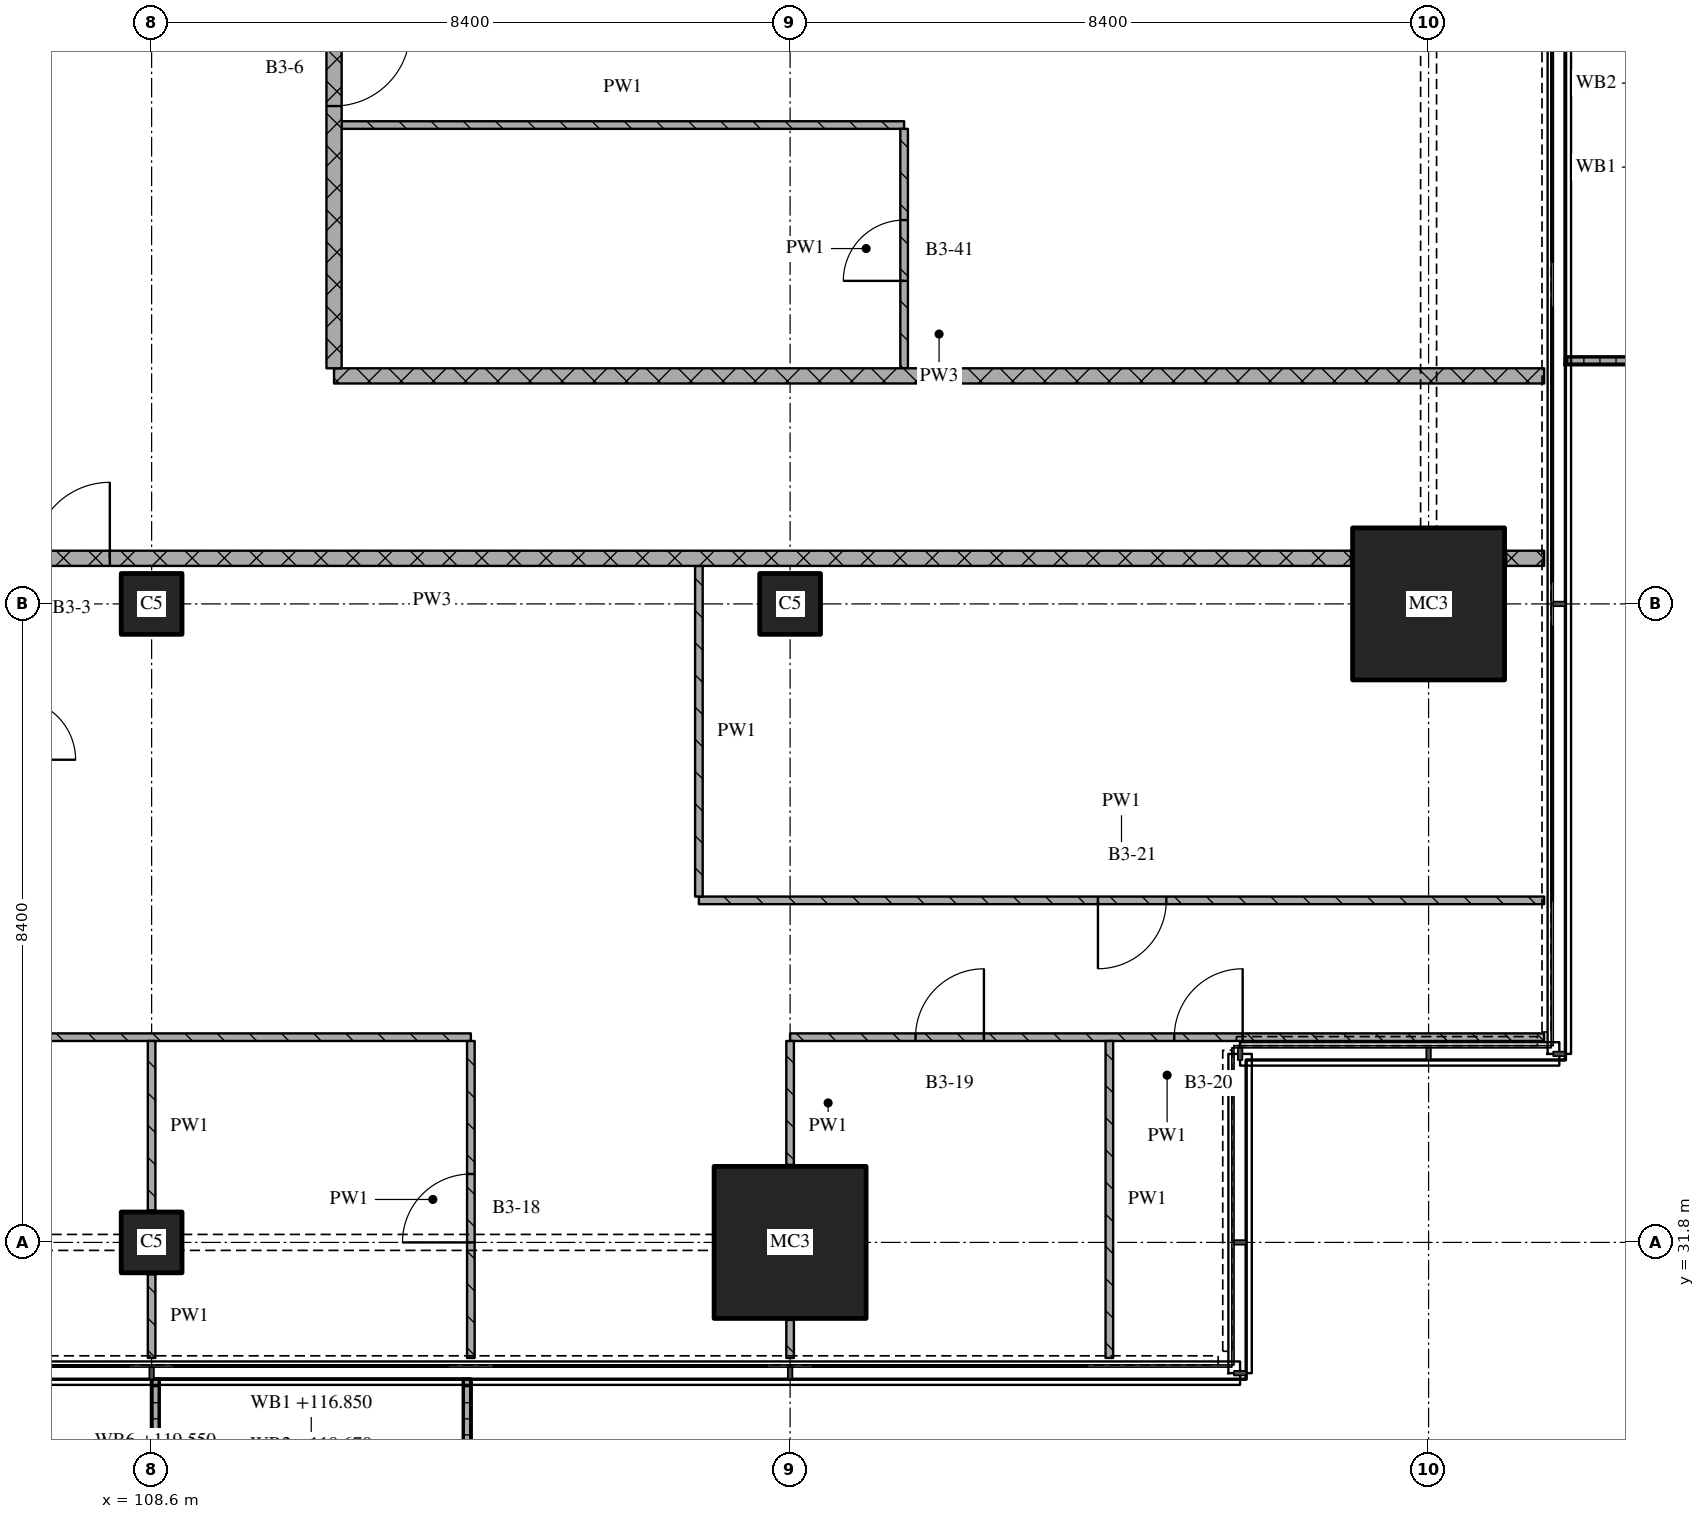
"""IFC4 building model, lengths in metres.
Left out: names, types, materials, properties, quantities, classifications, styles, units other than length and angle.
Written with IfcOpenShell. Run it as: python <this file> out.ifc"""

import sys

from ifc_helpers import new_model, si_unit, direction, frame, frame_2d, origin, origin_2d, place, context, subcontext, project, spatial, polyline, rectangle, outline, extrude, element, fill, save


model = new_model("IFC4")
c1 = context("Model", 3, precision=1e-05, world=origin(), true_north=direction((0.0, 1.0)))
c2 = subcontext(c1, "Body", "Model", "MODEL_VIEW")
j1 = project(units=[si_unit("LENGTHUNIT", "METRE"), si_unit("PLANEANGLEUNIT", "RADIAN")], contexts=[c1])
p1 = place(None, origin())
s1 = spatial("IfcSite", under=j1, at=p1, CompositionType="ELEMENT")
p2 = place(p1, origin())
s2 = spatial("IfcBuilding", under=s1, at=p2, CompositionType="ELEMENT")
p3 = place(p2, frame((0.0, 0.0, 116.85)))
s3 = spatial("IfcBuildingStorey", under=s2, at=p3, CompositionType="ELEMENT", Elevation=116.85)
for number, where, z_axis, x_axis in (
    (1, (108.6, 31.8, 0.0), (0.0, 0.0, 1.0), (1.0, 0.0, 0.0)),
    (2, (108.6, 40.2, 0.0), (0.0, 0.0, 1.0), (1.0, 0.0, 0.0)),
):
    element("IfcColumn", number, at=place(p3, frame(where, z_axis=z_axis, x_axis=x_axis)), inside=s3, PredefinedType="COLUMN", context=c2, shape_type="SweptSolid", body=[
        extrude(rectangle(XDim=0.8, YDim=0.8, at=origin_2d()), origin(), (0.0, 0.0, 1.0), 3.6),
    ])
p4 = place(p3, frame((117.0, 31.8, 0.0), z_axis=(0.0, 0.0, 1.0), x_axis=(1.0, 0.0, 0.0)))
e3 = element("IfcColumn", 3, at=p4, inside=s3, PredefinedType="COLUMN", context=c2, shape_type="SweptSolid", body=[
    extrude(rectangle(XDim=2.0, YDim=2.0, at=origin_2d()), origin(), (0.0, 0.0, 1.0), 3.6),
])
p5 = place(p3, frame((117.0, 40.2, 0.0), z_axis=(0.0, 0.0, 1.0), x_axis=(1.0, 0.0, 0.0)))
e4 = element("IfcColumn", 4, at=p5, inside=s3, PredefinedType="COLUMN", context=c2, shape_type="SweptSolid", body=[
    extrude(rectangle(XDim=0.8, YDim=0.8, at=origin_2d()), origin(), (0.0, 0.0, 1.0), 3.6),
])
p6 = place(p3, frame((125.4, 40.2, 0.0), z_axis=(0.0, 0.0, 1.0), x_axis=(1.0, 0.0, 0.0)))
e5 = element("IfcColumn", 5, at=p6, inside=s3, PredefinedType="COLUMN", context=c2, shape_type="SweptSolid", body=[
    extrude(rectangle(XDim=2.0, YDim=2.0, at=origin_2d()), origin(), (0.0, 0.0, 1.0), 3.6),
])
p7 = place(p3, origin())
e6 = element("IfcWall", 6, at=p7, inside=s3, PredefinedType="SOLIDWALL", context=c2, shape_type="SweptSolid", body=[
    extrude(outline(polyline([(108.6, 30.0), (108.7, 30.0), (108.7, 28.367), (112.7, 28.367), (112.7, 30.0), (112.8, 30.0), (112.8, 28.267), (108.6, 28.267), (108.6, 30.0)])), origin(), (0.0, 0.0, 1.0), 1.0),
])
p8 = place(p3, origin())
e7 = element("IfcWall", 7, at=p8, inside=s3, PredefinedType="SOLIDWALL", context=c2, shape_type="SweptSolid", body=[
    extrude(outline(polyline([(127.2, 43.35), (127.2, 43.45), (128.967, 43.45), (128.967, 49.55), (127.2, 49.55), (127.2, 49.65), (129.067, 49.65), (129.067, 43.35), (127.2, 43.35)])), origin(), (0.0, 0.0, 1.0), 1.0),
])
p9 = place(p3, frame((112.8, 34.5, 0.0), z_axis=(0.0, 0.0, 1.0), x_axis=(-1.0, 0.0, 0.0)))
e8 = element("IfcWall", 8, at=p9, inside=s3, PredefinedType="PARTITIONING", context=c2, shape_type="SweptSolid", body=[
    extrude(rectangle(XDim=12.5, YDim=0.1, at=frame_2d((6.25, 0.0))), origin(), (0.0, 0.0, 1.0), 3.32),
])
p10 = place(p9, frame((7.95, 0.0, 0.0)))
e9 = element("IfcOpeningElement", 9, at=p10, cuts=e8, PredefinedType="OPENING", context=c2, shape_type="SweptSolid", body=[
    extrude(rectangle(XDim=0.9, YDim=2.1, at=frame_2d((0.45, 1.05))), frame((0.0, 0.06, 0.0), z_axis=(0.0, -1.0, 0.0), x_axis=(1.0, 0.0, 0.0)), (0.0, 0.0, 1.0), 0.12),
])
p11 = place(p3, frame((126.92, 34.5, 0.0), z_axis=(0.0, 0.0, 1.0), x_axis=(-1.0, 0.0, 0.0)))
e10 = element("IfcWall", 10, at=p11, inside=s3, PredefinedType="PARTITIONING", context=c2, shape_type="SweptSolid", body=[
    extrude(rectangle(XDim=9.92, YDim=0.1, at=frame_2d((4.96, 0.0))), origin(), (0.0, 0.0, 1.0), 3.32),
])
p12 = place(p11, frame((3.966, 0.0, 0.0)))
e11 = element("IfcOpeningElement", 11, at=p12, cuts=e10, PredefinedType="OPENING", context=c2, shape_type="SweptSolid", body=[
    extrude(rectangle(XDim=0.9, YDim=2.1, at=frame_2d((0.45, 1.05))), frame((0.0, 0.06, 0.0), z_axis=(0.0, -1.0, 0.0), x_axis=(1.0, 0.0, 0.0)), (0.0, 0.0, 1.0), 0.12),
])
p13 = place(p11, frame((7.37, 0.0, 0.0)))
e12 = element("IfcOpeningElement", 12, at=p13, cuts=e10, PredefinedType="OPENING", context=c2, shape_type="SweptSolid", body=[
    extrude(rectangle(XDim=0.9, YDim=2.1, at=frame_2d((0.45, 1.05))), frame((0.0, 0.06, 0.0), z_axis=(0.0, -1.0, 0.0), x_axis=(1.0, 0.0, 0.0)), (0.0, 0.0, 1.0), 0.12),
])
p14 = place(p3, frame((115.8, 36.3, 0.0), z_axis=(0.0, 0.0, 1.0), x_axis=(1.0, 0.0, 0.0)))
e13 = element("IfcWall", 13, at=p14, inside=s3, PredefinedType="PARTITIONING", context=c2, shape_type="SweptSolid", body=[
    extrude(rectangle(XDim=11.12, YDim=0.1, at=frame_2d((5.56, 0.0))), origin(), (0.0, 0.0, 1.0), 3.32),
])
p15 = place(p14, frame((5.25, 0.0, 0.0)))
e14 = element("IfcOpeningElement", 14, at=p15, cuts=e13, PredefinedType="OPENING", context=c2, shape_type="SweptSolid", body=[
    extrude(rectangle(XDim=0.9, YDim=2.1, at=frame_2d((0.45, 1.05))), frame((0.0, 0.06, 0.0), z_axis=(0.0, -1.0, 0.0), x_axis=(1.0, 0.0, 0.0)), (0.0, 0.0, 1.0), 0.12),
])
p16 = place(p3, frame((124.38, 40.8, 0.0), z_axis=(0.0, 0.0, 1.0), x_axis=(-1.0, 0.0, 0.0)))
e15 = element("IfcWall", 15, at=p16, inside=s3, PredefinedType="PARTITIONING", context=c2, shape_type="SweptSolid", body=[
    extrude(rectangle(XDim=24.18, YDim=0.2, at=frame_2d((12.09, 0.0))), origin(), (0.0, 0.0, 1.0), 3.32),
])
p17 = place(p16, frame((16.33, 0.0, 0.0)))
e16 = element("IfcOpeningElement", 16, at=p17, cuts=e15, PredefinedType="OPENING", context=c2, shape_type="SweptSolid", body=[
    extrude(rectangle(XDim=1.0, YDim=2.1, at=frame_2d((0.5, 1.05))), frame((0.0, 0.11, 0.0), z_axis=(0.0, -1.0, 0.0), x_axis=(1.0, 0.0, 0.0)), (0.0, 0.0, 1.0), 0.22),
])
p18 = place(p3, frame((126.42, 40.8, 0.0), z_axis=(0.0, 0.0, 1.0), x_axis=(1.0, 0.0, 0.0)))
e17 = element("IfcWall", 17, at=p18, inside=s3, PredefinedType="PARTITIONING", context=c2, shape_type="SweptSolid", body=[
    extrude(rectangle(XDim=0.5, YDim=0.2, at=frame_2d((0.25, 0.0))), origin(), (0.0, 0.0, 1.0), 3.32),
])
p19 = place(p3, frame((111.0, 43.2, 0.0), z_axis=(0.0, 0.0, 1.0), x_axis=(1.0, 0.0, 0.0)))
e18 = element("IfcWall", 18, at=p19, inside=s3, PredefinedType="PARTITIONING", context=c2, shape_type="SweptSolid", body=[
    extrude(rectangle(XDim=15.92, YDim=0.2, at=frame_2d((7.96, 0.0))), origin(), (0.0, 0.0, 1.0), 3.32),
])
p20 = place(p3, frame((111.1, 46.5, 0.0), z_axis=(0.0, 0.0, 1.0), x_axis=(1.0, 0.0, 0.0)))
e19 = element("IfcWall", 19, at=p20, inside=s3, PredefinedType="PARTITIONING", context=c2, shape_type="SweptSolid", body=[
    extrude(rectangle(XDim=7.4, YDim=0.1, at=frame_2d((3.7, 0.0))), origin(), (0.0, 0.0, 1.0), 3.32),
])
p21 = place(p3, frame((108.6, 31.38, 0.0), z_axis=(0.0, 0.0, 1.0), x_axis=(0.0, -1.0, 0.0)))
e20 = element("IfcWall", 20, at=p21, inside=s3, PredefinedType="PARTITIONING", context=c2, shape_type="SweptSolid", body=[
    extrude(rectangle(XDim=1.1, YDim=0.1, at=frame_2d((0.55, 0.0))), origin(), (0.0, 0.0, 1.0), 3.32),
])
p22 = place(p3, frame((108.6, 34.45, 0.0), z_axis=(0.0, 0.0, 1.0), x_axis=(0.0, -1.0, 0.0)))
e21 = element("IfcWall", 21, at=p22, inside=s3, PredefinedType="PARTITIONING", context=c2, shape_type="SweptSolid", body=[
    extrude(rectangle(XDim=2.23, YDim=0.1, at=frame_2d((1.115, 0.0))), origin(), (0.0, 0.0, 1.0), 3.32),
])
p23 = place(p3, frame((111.0, 75.32, 0.0), z_axis=(0.0, 0.0, 1.0), x_axis=(0.0, -1.0, 0.0)))
e22 = element("IfcWall", 22, at=p23, inside=s3, PredefinedType="PARTITIONING", context=c2, shape_type="SweptSolid", body=[
    extrude(rectangle(XDim=32.02, YDim=0.2, at=frame_2d((16.01, 0.0))), origin(), (0.0, 0.0, 1.0), 3.32),
])
p24 = place(p23, frame((11.37, 0.0, 0.0)))
e23 = element("IfcOpeningElement", 23, at=p24, cuts=e22, PredefinedType="OPENING", context=c2, shape_type="SweptSolid", body=[
    extrude(rectangle(XDim=1.0, YDim=2.1, at=frame_2d((0.5, 1.05))), frame((0.0, 0.11, 0.0), z_axis=(0.0, -1.0, 0.0), x_axis=(1.0, 0.0, 0.0)), (0.0, 0.0, 1.0), 0.22),
])
p25 = place(p23, frame((27.57, 0.0, 0.0)))
e24 = element("IfcOpeningElement", 24, at=p25, cuts=e22, PredefinedType="OPENING", context=c2, shape_type="SweptSolid", body=[
    extrude(rectangle(XDim=1.0, YDim=2.1, at=frame_2d((0.5, 1.05))), frame((0.0, 0.11, 0.0), z_axis=(0.0, -1.0, 0.0), x_axis=(1.0, 0.0, 0.0)), (0.0, 0.0, 1.0), 0.22),
])
p26 = place(p3, frame((112.8, 30.28, 0.0), z_axis=(0.0, 0.0, 1.0), x_axis=(0.0, 1.0, 0.0)))
e25 = element("IfcWall", 25, at=p26, inside=s3, PredefinedType="PARTITIONING", context=c2, shape_type="SweptSolid", body=[
    extrude(rectangle(XDim=4.17, YDim=0.1, at=frame_2d((2.085, 0.0))), origin(), (0.0, 0.0, 1.0), 3.32),
])
p27 = place(p26, frame((1.52, 0.0, 0.0)))
e26 = element("IfcOpeningElement", 26, at=p27, cuts=e25, PredefinedType="OPENING", context=c2, shape_type="SweptSolid", body=[
    extrude(rectangle(XDim=0.9, YDim=2.1, at=frame_2d((0.45, 1.05))), frame((0.0, 0.06, 0.0), z_axis=(0.0, -1.0, 0.0), x_axis=(1.0, 0.0, 0.0)), (0.0, 0.0, 1.0), 0.12),
])
p28 = place(p3, frame((115.8, 40.7, 0.0), z_axis=(0.0, 0.0, 1.0), x_axis=(0.0, -1.0, 0.0)))
e27 = element("IfcWall", 27, at=p28, inside=s3, PredefinedType="PARTITIONING", context=c2, shape_type="SweptSolid", body=[
    extrude(rectangle(XDim=4.35, YDim=0.1, at=frame_2d((2.175, 0.0))), origin(), (0.0, 0.0, 1.0), 3.32),
])
p29 = place(p3, frame((117.0, 30.78, 0.0), z_axis=(0.0, 0.0, 1.0), x_axis=(0.0, -1.0, 0.0)))
e28 = element("IfcWall", 28, at=p29, inside=s3, PredefinedType="PARTITIONING", context=c2, shape_type="SweptSolid", body=[
    extrude(rectangle(XDim=0.5, YDim=0.1, at=frame_2d((0.25, 0.0))), origin(), (0.0, 0.0, 1.0), 3.32),
])
p30 = place(p3, frame((117.0, 34.45, 0.0), z_axis=(0.0, 0.0, 1.0), x_axis=(0.0, -1.0, 0.0)))
e29 = element("IfcWall", 29, at=p30, inside=s3, PredefinedType="PARTITIONING", context=c2, shape_type="SweptSolid", body=[
    extrude(rectangle(XDim=1.63, YDim=0.1, at=frame_2d((0.815, 0.0))), origin(), (0.0, 0.0, 1.0), 3.32),
])
p31 = place(p3, frame((118.5, 43.3, 0.0), z_axis=(0.0, 0.0, 1.0), x_axis=(0.0, 1.0, 0.0)))
e30 = element("IfcWall", 30, at=p31, inside=s3, PredefinedType="PARTITIONING", context=c2, shape_type="SweptSolid", body=[
    extrude(rectangle(XDim=3.15, YDim=0.1, at=frame_2d((1.575, 0.0))), origin(), (0.0, 0.0, 1.0), 3.32),
])
p32 = place(p31, frame((1.15, 0.0, 0.0)))
e31 = element("IfcOpeningElement", 31, at=p32, cuts=e30, PredefinedType="OPENING", context=c2, shape_type="SweptSolid", body=[
    extrude(rectangle(XDim=0.8, YDim=2.1, at=frame_2d((0.4, 1.05))), frame((0.0, 0.06, 0.0), z_axis=(0.0, -1.0, 0.0), x_axis=(1.0, 0.0, 0.0)), (0.0, 0.0, 1.0), 0.12),
])
p33 = place(p3, frame((121.2, 34.45, 0.0), z_axis=(0.0, 0.0, 1.0), x_axis=(0.0, -1.0, 0.0)))
e32 = element("IfcWall", 32, at=p33, inside=s3, PredefinedType="PARTITIONING", context=c2, shape_type="SweptSolid", body=[
    extrude(rectangle(XDim=4.17, YDim=0.1, at=frame_2d((2.085, 0.0))), origin(), (0.0, 0.0, 1.0), 3.32),
])
p34 = place(p12, origin())
e33 = element("IfcDoor", 33, at=p34, inside=s3, OperationType="SINGLE_SWING_RIGHT", PredefinedType="DOOR", context=c2, shape_type="SweptSolid", body=[
    extrude(rectangle(XDim=0.9, YDim=2.1, at=frame_2d((0.45, 1.05))), frame((0.0, 0.025, 0.0), z_axis=(0.0, -1.0, 0.0), x_axis=(1.0, 0.0, 0.0)), (0.0, 0.0, 1.0), 0.05),
])
fill(e11, e33)
p35 = place(p13, origin())
e34 = element("IfcDoor", 34, at=p35, inside=s3, OperationType="SINGLE_SWING_RIGHT", PredefinedType="DOOR", context=c2, shape_type="SweptSolid", body=[
    extrude(rectangle(XDim=0.9, YDim=2.1, at=frame_2d((0.45, 1.05))), frame((0.0, 0.025, 0.0), z_axis=(0.0, -1.0, 0.0), x_axis=(1.0, 0.0, 0.0)), (0.0, 0.0, 1.0), 0.05),
])
fill(e12, e34)
p36 = place(p15, origin())
e35 = element("IfcDoor", 35, at=p36, inside=s3, OperationType="SINGLE_SWING_RIGHT", PredefinedType="DOOR", context=c2, shape_type="SweptSolid", body=[
    extrude(rectangle(XDim=0.9, YDim=2.1, at=frame_2d((0.45, 1.05))), frame((0.0, 0.025, 0.0), z_axis=(0.0, -1.0, 0.0), x_axis=(1.0, 0.0, 0.0)), (0.0, 0.0, 1.0), 0.05),
])
fill(e14, e35)
p37 = place(p17, origin())
e36 = element("IfcDoor", 36, at=p37, inside=s3, OperationType="SINGLE_SWING_RIGHT", PredefinedType="DOOR", context=c2, shape_type="SweptSolid", body=[
    extrude(rectangle(XDim=1.0, YDim=2.1, at=frame_2d((0.5, 1.05))), frame((0.0, 0.025, 0.0), z_axis=(0.0, -1.0, 0.0), x_axis=(1.0, 0.0, 0.0)), (0.0, 0.0, 1.0), 0.05),
])
fill(e16, e36)
p38 = place(p25, origin())
e37 = element("IfcDoor", 37, at=p38, inside=s3, OperationType="SINGLE_SWING_LEFT", PredefinedType="DOOR", context=c2, shape_type="SweptSolid", body=[
    extrude(rectangle(XDim=1.0, YDim=2.1, at=frame_2d((0.5, 1.05))), frame((0.0, 0.025, 0.0), z_axis=(0.0, -1.0, 0.0), x_axis=(1.0, 0.0, 0.0)), (0.0, 0.0, 1.0), 0.05),
])
fill(e24, e37)
p39 = place(p27, origin())
e38 = element("IfcDoor", 38, at=p39, inside=s3, OperationType="SINGLE_SWING_LEFT", PredefinedType="DOOR", context=c2, shape_type="SweptSolid", body=[
    extrude(rectangle(XDim=0.9, YDim=2.1, at=frame_2d((0.45, 1.05))), frame((0.0, 0.025, 0.0), z_axis=(0.0, -1.0, 0.0), x_axis=(1.0, 0.0, 0.0)), (0.0, 0.0, 1.0), 0.05),
])
fill(e26, e38)
p40 = place(p32, origin())
e39 = element("IfcDoor", 39, at=p40, inside=s3, OperationType="SINGLE_SWING_LEFT", PredefinedType="DOOR", context=c2, shape_type="SweptSolid", body=[
    extrude(rectangle(XDim=0.8, YDim=2.1, at=frame_2d((0.4, 1.05))), frame((0.0, 0.025, 0.0), z_axis=(0.0, -1.0, 0.0), x_axis=(1.0, 0.0, 0.0)), (0.0, 0.0, 1.0), 0.05),
])
fill(e31, e39)
save(model, sys.argv[1])
